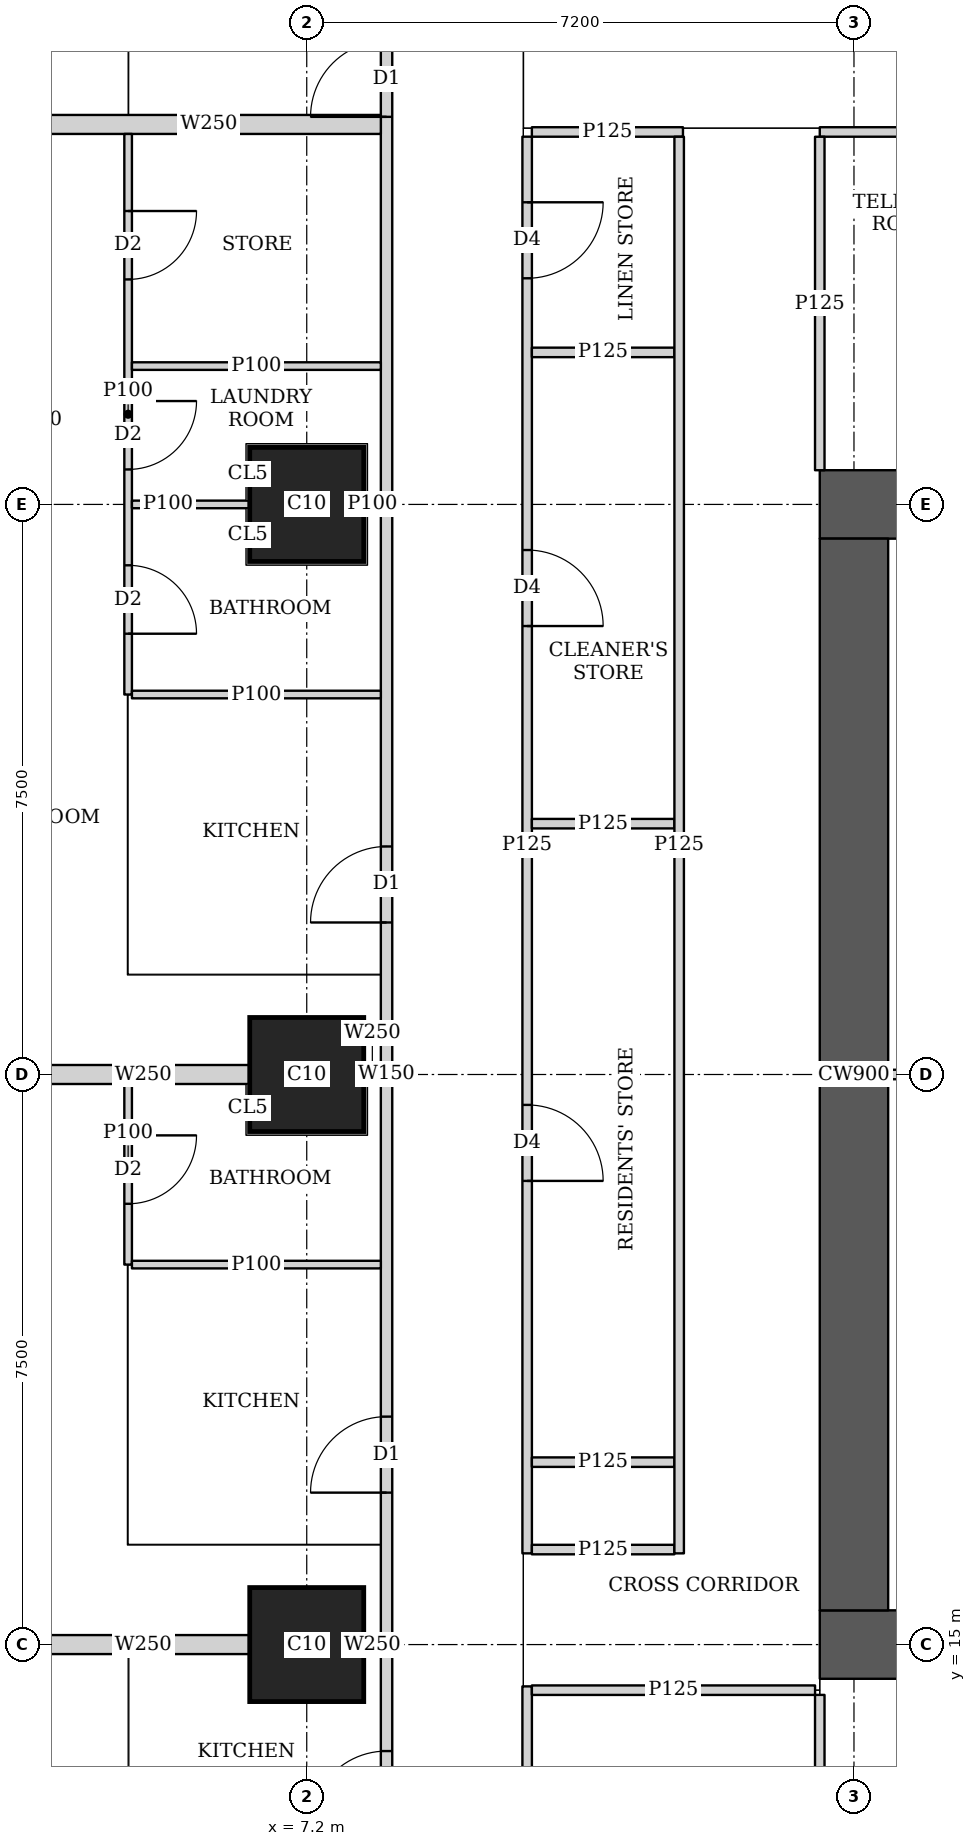
"""IFC4 building model, lengths in metres.
Left out: names, types, materials, properties, quantities, classifications, styles, units other than length and angle.
Written with IfcOpenShell. Run it as: python <this file> out.ifc"""

import sys

from ifc_helpers import new_model, si_unit, direction, frame, frame_2d, origin, origin_2d, place, context, subcontext, project, spatial, rectangle, extrude, element, fill, save


model = new_model("IFC4")
c1 = context("Model", 3, precision=1e-05, world=origin(), true_north=direction((0.0, 1.0)))
c2 = subcontext(c1, "Body", "Model", "MODEL_VIEW")
j1 = project(units=[si_unit("LENGTHUNIT", "METRE"), si_unit("PLANEANGLEUNIT", "RADIAN")], contexts=[c1])
p1 = place(None, origin())
s1 = spatial("IfcSite", under=j1, at=p1, CompositionType="ELEMENT")
p2 = place(p1, origin())
s2 = spatial("IfcBuilding", under=s1, at=p2, CompositionType="ELEMENT")
p3 = place(p2, frame((0.0, 0.0, 169.55)))
s3 = spatial("IfcBuildingStorey", under=s2, at=p3, CompositionType="ELEMENT", Elevation=169.55)
for number, where, z_axis, x_axis in (
    (1, (7.2, 15.0, 0.0), (0.0, 0.0, 1.0), (1.0, 0.0, 0.0)),
    (2, (7.2, 22.5, 0.0), (0.0, 0.0, 1.0), (1.0, 0.0, 0.0)),
    (3, (7.2, 30.0, 0.0), (0.0, 0.0, 1.0), (1.0, 0.0, 0.0)),
):
    element("IfcColumn", number, at=place(p3, frame(where, z_axis=z_axis, x_axis=x_axis)), inside=s3, PredefinedType="COLUMN", context=c2, shape_type="SweptSolid", body=[
        extrude(rectangle(XDim=1.5, YDim=1.5, at=origin_2d()), origin(), (0.0, 0.0, 1.0), 3.75),
    ])
p4 = place(p3, frame((13.95, 15.0, 0.0), z_axis=(0.0, 0.0, 1.0), x_axis=(1.0, 0.0, 0.0)))
e4 = element("IfcWall", 4, at=p4, inside=s3, PredefinedType="SHEAR", context=c2, shape_type="SweptSolid", body=[
    extrude(rectangle(XDim=15.3, YDim=0.9, at=frame_2d((7.65, 0.0))), origin(), (0.0, 0.0, 1.0), 3.75),
])
p5 = place(p4, frame((4.45, 0.0, 0.0)))
e5 = element("IfcOpeningElement", 5, at=p5, cuts=e4, PredefinedType="OPENING", context=c2, shape_type="SweptSolid", body=[
    extrude(rectangle(XDim=1.8, YDim=2.1, at=frame_2d((0.9, 1.05))), frame((0.0, 0.46, 0.0), z_axis=(0.0, -1.0, 0.0), x_axis=(1.0, 0.0, 0.0)), (0.0, 0.0, 1.0), 0.92),
])
p6 = place(p4, frame((10.7, 0.0, 0.0)))
e6 = element("IfcOpeningElement", 6, at=p6, cuts=e4, PredefinedType="OPENING", context=c2, shape_type="SweptSolid", body=[
    extrude(rectangle(XDim=1.1, YDim=2.1, at=frame_2d((0.55, 1.05))), frame((0.0, 0.46, 0.0), z_axis=(0.0, -1.0, 0.0), x_axis=(1.0, 0.0, 0.0)), (0.0, 0.0, 1.0), 0.92),
])
p7 = place(p3, frame((13.95, 30.0, 0.0), z_axis=(0.0, 0.0, 1.0), x_axis=(1.0, 0.0, 0.0)))
e7 = element("IfcWall", 7, at=p7, inside=s3, PredefinedType="SHEAR", context=c2, shape_type="SweptSolid", body=[
    extrude(rectangle(XDim=15.3, YDim=0.9, at=frame_2d((7.65, 0.0))), origin(), (0.0, 0.0, 1.0), 3.75),
])
p8 = place(p7, frame((4.45, 0.0, 0.0)))
e8 = element("IfcOpeningElement", 8, at=p8, cuts=e7, PredefinedType="OPENING", context=c2, shape_type="SweptSolid", body=[
    extrude(rectangle(XDim=1.8, YDim=2.1, at=frame_2d((0.9, 1.05))), frame((0.0, 0.46, 0.0), z_axis=(0.0, -1.0, 0.0), x_axis=(1.0, 0.0, 0.0)), (0.0, 0.0, 1.0), 0.92),
])
p9 = place(p7, frame((10.7, 0.0, 0.0)))
e9 = element("IfcOpeningElement", 9, at=p9, cuts=e7, PredefinedType="OPENING", context=c2, shape_type="SweptSolid", body=[
    extrude(rectangle(XDim=1.1, YDim=2.1, at=frame_2d((0.55, 1.05))), frame((0.0, 0.46, 0.0), z_axis=(0.0, -1.0, 0.0), x_axis=(1.0, 0.0, 0.0)), (0.0, 0.0, 1.0), 0.92),
])
p10 = place(p3, frame((14.4, 15.45, 0.0), z_axis=(0.0, 0.0, 1.0), x_axis=(0.0, 1.0, 0.0)))
e10 = element("IfcWall", 10, at=p10, inside=s3, PredefinedType="SHEAR", context=c2, shape_type="SweptSolid", body=[
    extrude(rectangle(XDim=14.1, YDim=0.9, at=frame_2d((7.05, 0.0))), origin(), (0.0, 0.0, 1.0), 3.75),
])
p11 = place(p3, frame((8.25, 1.957, 0.0), z_axis=(0.0, 0.0, 1.0), x_axis=(0.0, 1.0, 0.0)))
e11 = element("IfcWall", 11, at=p11, inside=s3, PredefinedType="SOLIDWALL", context=c2, shape_type="SweptSolid", body=[
    extrude(rectangle(XDim=41.111, YDim=0.15, at=frame_2d((20.556, 0.0))), origin(), (0.0, 0.0, 1.0), 3.5),
])
p12 = place(p11, frame((10.642, 0.0, 0.0)))
e12 = element("IfcOpeningElement", 12, at=p12, cuts=e11, PredefinedType="OPENING", context=c2, shape_type="SweptSolid", body=[
    extrude(rectangle(XDim=1.0, YDim=2.1, at=frame_2d((0.5, 1.05))), frame((0.0, 0.085, 0.0), z_axis=(0.0, -1.0, 0.0), x_axis=(1.0, 0.0, 0.0)), (0.0, 0.0, 1.0), 0.17),
])
p13 = place(p11, frame((15.042, 0.0, 0.0)))
e13 = element("IfcOpeningElement", 13, at=p13, cuts=e11, PredefinedType="OPENING", context=c2, shape_type="SweptSolid", body=[
    extrude(rectangle(XDim=1.0, YDim=2.1, at=frame_2d((0.5, 1.05))), frame((0.0, 0.085, 0.0), z_axis=(0.0, -1.0, 0.0), x_axis=(1.0, 0.0, 0.0)), (0.0, 0.0, 1.0), 0.17),
])
p14 = place(p11, frame((22.543, 0.0, 0.0)))
e14 = element("IfcOpeningElement", 14, at=p14, cuts=e11, PredefinedType="OPENING", context=c2, shape_type="SweptSolid", body=[
    extrude(rectangle(XDim=1.0, YDim=2.1, at=frame_2d((0.5, 1.05))), frame((0.0, 0.085, 0.0), z_axis=(0.0, -1.0, 0.0), x_axis=(1.0, 0.0, 0.0)), (0.0, 0.0, 1.0), 0.17),
])
p15 = place(p11, frame((33.142, 0.0, 0.0)))
e15 = element("IfcOpeningElement", 15, at=p15, cuts=e11, PredefinedType="OPENING", context=c2, shape_type="SweptSolid", body=[
    extrude(rectangle(XDim=1.0, YDim=2.1, at=frame_2d((0.5, 1.05))), frame((0.0, 0.085, 0.0), z_axis=(0.0, -1.0, 0.0), x_axis=(1.0, 0.0, 0.0)), (0.0, 0.0, 1.0), 0.17),
])
p16 = place(p3, frame((4.85, 19.999, 0.0), z_axis=(0.0, 0.0, 1.0), x_axis=(0.0, 1.0, 0.0)))
e16 = element("IfcWall", 16, at=p16, inside=s3, PredefinedType="PARTITIONING", context=c2, shape_type="SweptSolid", body=[
    extrude(rectangle(XDim=2.376, YDim=0.1, at=frame_2d((1.188, 0.0))), origin(), (0.0, 0.0, 1.0), 3.5),
])
p17 = place(p16, frame((0.8, 0.0, 0.0)))
e17 = element("IfcOpeningElement", 17, at=p17, cuts=e16, PredefinedType="OPENING", context=c2, shape_type="SweptSolid", body=[
    extrude(rectangle(XDim=0.9, YDim=2.1, at=frame_2d((0.45, 1.05))), frame((0.0, 0.06, 0.0), z_axis=(0.0, -1.0, 0.0), x_axis=(1.0, 0.0, 0.0)), (0.0, 0.0, 1.0), 0.12),
])
p18 = place(p3, frame((4.9, 19.999, 0.0), z_axis=(0.0, 0.0, 1.0), x_axis=(1.0, 0.0, 0.0)))
e18 = element("IfcWall", 18, at=p18, inside=s3, PredefinedType="PARTITIONING", context=c2, shape_type="SweptSolid", body=[
    extrude(rectangle(XDim=3.275, YDim=0.1, at=frame_2d((1.638, 0.0))), origin(), (0.0, 0.0, 1.0), 3.5),
])
p19 = place(p3, frame((3.65, 15.0, 0.0), z_axis=(0.0, 0.0, 1.0), x_axis=(1.0, 0.0, 0.0)))
e19 = element("IfcWall", 19, at=p19, inside=s3, PredefinedType="SOLIDWALL", context=c2, shape_type="SweptSolid", body=[
    extrude(rectangle(XDim=2.799, YDim=0.25, at=frame_2d((1.399, 0.0))), origin(), (0.0, 0.0, 1.0), 3.5),
])
p20 = place(p3, frame((7.951, 15.0, 0.0), z_axis=(0.0, 0.0, 1.0), x_axis=(1.0, 0.0, 0.0)))
e20 = element("IfcWall", 20, at=p20, inside=s3, PredefinedType="SOLIDWALL", context=c2, shape_type="SweptSolid", body=[
    extrude(rectangle(XDim=0.224, YDim=0.25, at=frame_2d((0.112, 0.0))), origin(), (0.0, 0.0, 1.0), 3.5),
])
p21 = place(p3, frame((4.85, 27.499, 0.0), z_axis=(0.0, 0.0, 1.0), x_axis=(0.0, 1.0, 0.0)))
e21 = element("IfcWall", 21, at=p21, inside=s3, PredefinedType="PARTITIONING", context=c2, shape_type="SweptSolid", body=[
    extrude(rectangle(XDim=7.375, YDim=0.1, at=frame_2d((3.688, 0.0))), origin(), (0.0, 0.0, 1.0), 3.5),
])
p22 = place(p21, frame((0.8, 0.0, 0.0)))
e22 = element("IfcOpeningElement", 22, at=p22, cuts=e21, PredefinedType="OPENING", context=c2, shape_type="SweptSolid", body=[
    extrude(rectangle(XDim=0.9, YDim=2.1, at=frame_2d((0.45, 1.05))), frame((0.0, 0.06, 0.0), z_axis=(0.0, -1.0, 0.0), x_axis=(1.0, 0.0, 0.0)), (0.0, 0.0, 1.0), 0.12),
])
p23 = place(p21, frame((2.961, 0.0, 0.0)))
e23 = element("IfcOpeningElement", 23, at=p23, cuts=e21, PredefinedType="OPENING", context=c2, shape_type="SweptSolid", body=[
    extrude(rectangle(XDim=0.9, YDim=2.1, at=frame_2d((0.45, 1.05))), frame((0.0, 0.06, 0.0), z_axis=(0.0, -1.0, 0.0), x_axis=(1.0, 0.0, 0.0)), (0.0, 0.0, 1.0), 0.12),
])
p24 = place(p21, frame((5.461, 0.0, 0.0)))
e24 = element("IfcOpeningElement", 24, at=p24, cuts=e21, PredefinedType="OPENING", context=c2, shape_type="SweptSolid", body=[
    extrude(rectangle(XDim=0.9, YDim=2.1, at=frame_2d((0.45, 1.05))), frame((0.0, 0.06, 0.0), z_axis=(0.0, -1.0, 0.0), x_axis=(1.0, 0.0, 0.0)), (0.0, 0.0, 1.0), 0.12),
])
p25 = place(p3, frame((4.9, 27.499, 0.0), z_axis=(0.0, 0.0, 1.0), x_axis=(1.0, 0.0, 0.0)))
e25 = element("IfcWall", 25, at=p25, inside=s3, PredefinedType="PARTITIONING", context=c2, shape_type="SweptSolid", body=[
    extrude(rectangle(XDim=3.275, YDim=0.1, at=frame_2d((1.638, 0.0))), origin(), (0.0, 0.0, 1.0), 3.5),
])
p26 = place(p3, frame((4.9, 30.0, 0.0), z_axis=(0.0, 0.0, 1.0), x_axis=(1.0, 0.0, 0.0)))
e26 = element("IfcWall", 26, at=p26, inside=s3, PredefinedType="PARTITIONING", context=c2, shape_type="SweptSolid", body=[
    extrude(rectangle(XDim=1.549, YDim=0.1, at=frame_2d((0.774, 0.0))), origin(), (0.0, 0.0, 1.0), 3.5),
])
p27 = place(p3, frame((7.951, 30.0, 0.0), z_axis=(0.0, 0.0, 1.0), x_axis=(1.0, 0.0, 0.0)))
e27 = element("IfcWall", 27, at=p27, inside=s3, PredefinedType="PARTITIONING", context=c2, shape_type="SweptSolid", body=[
    extrude(rectangle(XDim=0.224, YDim=0.1, at=frame_2d((0.112, 0.0))), origin(), (0.0, 0.0, 1.0), 3.5),
])
p28 = place(p3, frame((4.9, 31.82, 0.0), z_axis=(0.0, 0.0, 1.0), x_axis=(1.0, 0.0, 0.0)))
e28 = element("IfcWall", 28, at=p28, inside=s3, PredefinedType="PARTITIONING", context=c2, shape_type="SweptSolid", body=[
    extrude(rectangle(XDim=3.275, YDim=0.1, at=frame_2d((1.638, 0.0))), origin(), (0.0, 0.0, 1.0), 3.5),
])
p29 = place(p3, frame((3.65, 22.5, 0.0), z_axis=(0.0, 0.0, 1.0), x_axis=(1.0, 0.0, 0.0)))
e29 = element("IfcWall", 29, at=p29, inside=s3, PredefinedType="SOLIDWALL", context=c2, shape_type="SweptSolid", body=[
    extrude(rectangle(XDim=2.799, YDim=0.25, at=frame_2d((1.399, 0.0))), origin(), (0.0, 0.0, 1.0), 3.5),
])
p30 = place(p3, frame((7.951, 22.5, 0.0), z_axis=(0.0, 0.0, 1.0), x_axis=(1.0, 0.0, 0.0)))
e30 = element("IfcWall", 30, at=p30, inside=s3, PredefinedType="SOLIDWALL", context=c2, shape_type="SweptSolid", body=[
    extrude(rectangle(XDim=0.224, YDim=0.25, at=frame_2d((0.112, 0.0))), origin(), (0.0, 0.0, 1.0), 3.5),
])
p31 = place(p3, frame((3.65, 34.999, 0.0), z_axis=(0.0, 0.0, 1.0), x_axis=(1.0, 0.0, 0.0)))
e31 = element("IfcWall", 31, at=p31, inside=s3, PredefinedType="SOLIDWALL", context=c2, shape_type="SweptSolid", body=[
    extrude(rectangle(XDim=4.525, YDim=0.25, at=frame_2d((2.263, 0.0))), origin(), (0.0, 0.0, 1.0), 3.5),
])
p32 = place(p3, frame((10.1, 10.162, 0.0), z_axis=(0.0, 0.0, 1.0), x_axis=(0.0, 1.0, 0.0)))
e32 = element("IfcWall", 32, at=p32, inside=s3, PredefinedType="PARTITIONING", context=c2, shape_type="SweptSolid", body=[
    extrude(rectangle(XDim=4.288, YDim=0.125, at=frame_2d((2.144, 0.0))), origin(), (0.0, 0.0, 1.0), 3.5),
])
p33 = place(p32, frame((1.563, 0.0, 0.0)))
e33 = element("IfcOpeningElement", 33, at=p33, cuts=e32, PredefinedType="OPENING", context=c2, shape_type="SweptSolid", body=[
    extrude(rectangle(XDim=1.0, YDim=2.1, at=frame_2d((0.5, 1.05))), frame((0.0, 0.073, 0.0), z_axis=(0.0, -1.0, 0.0), x_axis=(1.0, 0.0, 0.0)), (0.0, 0.0, 1.0), 0.145),
])
p34 = place(p3, frame((10.1, 16.2, 0.0), z_axis=(0.0, 0.0, 1.0), x_axis=(0.0, 1.0, 0.0)))
e34 = element("IfcWall", 34, at=p34, inside=s3, PredefinedType="PARTITIONING", context=c2, shape_type="SweptSolid", body=[
    extrude(rectangle(XDim=18.638, YDim=0.125, at=frame_2d((9.319, 0.0))), origin(), (0.0, 0.0, 1.0), 3.5),
])
p35 = place(p34, frame((4.9, 0.0, 0.0)))
e35 = element("IfcOpeningElement", 35, at=p35, cuts=e34, PredefinedType="OPENING", context=c2, shape_type="SweptSolid", body=[
    extrude(rectangle(XDim=1.0, YDim=2.1, at=frame_2d((0.5, 1.05))), frame((0.0, 0.073, 0.0), z_axis=(0.0, -1.0, 0.0), x_axis=(1.0, 0.0, 0.0)), (0.0, 0.0, 1.0), 0.145),
])
p36 = place(p34, frame((12.2, 0.0, 0.0)))
e36 = element("IfcOpeningElement", 36, at=p36, cuts=e34, PredefinedType="OPENING", context=c2, shape_type="SweptSolid", body=[
    extrude(rectangle(XDim=1.0, YDim=2.1, at=frame_2d((0.5, 1.05))), frame((0.0, 0.073, 0.0), z_axis=(0.0, -1.0, 0.0), x_axis=(1.0, 0.0, 0.0)), (0.0, 0.0, 1.0), 0.145),
])
p37 = place(p34, frame((16.775, 0.0, 0.0)))
e37 = element("IfcOpeningElement", 37, at=p37, cuts=e34, PredefinedType="OPENING", context=c2, shape_type="SweptSolid", body=[
    extrude(rectangle(XDim=1.0, YDim=2.1, at=frame_2d((0.5, 1.05))), frame((0.0, 0.073, 0.0), z_axis=(0.0, -1.0, 0.0), x_axis=(1.0, 0.0, 0.0)), (0.0, 0.0, 1.0), 0.145),
])
p38 = place(p3, frame((10.162, 14.4, 0.0), z_axis=(0.0, 0.0, 1.0), x_axis=(1.0, 0.0, 0.0)))
e38 = element("IfcWall", 38, at=p38, inside=s3, PredefinedType="PARTITIONING", context=c2, shape_type="SweptSolid", body=[
    extrude(rectangle(XDim=3.726, YDim=0.125, at=frame_2d((1.863, 0.0))), origin(), (0.0, 0.0, 1.0), 3.5),
])
for number, where, z_axis, x_axis in (
    (39, (10.162, 17.4, 0.0), (0.0, 0.0, 1.0), (1.0, 0.0, 0.0)),
    (40, (10.162, 25.8, 0.0), (0.0, 0.0, 1.0), (1.0, 0.0, 0.0)),
    (41, (10.162, 32.0, 0.0), (0.0, 0.0, 1.0), (1.0, 0.0, 0.0)),
):
    element("IfcWall", number, at=place(p3, frame(where, z_axis=z_axis, x_axis=x_axis)), inside=s3, PredefinedType="PARTITIONING", context=c2, shape_type="SweptSolid", body=[
        extrude(rectangle(XDim=1.875, YDim=0.125, at=frame_2d((0.938, 0.0))), origin(), (0.0, 0.0, 1.0), 3.5),
    ])
p39 = place(p3, frame((12.1, 16.2, 0.0), z_axis=(0.0, 0.0, 1.0), x_axis=(0.0, 1.0, 0.0)))
e42 = element("IfcWall", 42, at=p39, inside=s3, PredefinedType="PARTITIONING", context=c2, shape_type="SweptSolid", body=[
    extrude(rectangle(XDim=18.637, YDim=0.125, at=frame_2d((9.318, 0.0))), origin(), (0.0, 0.0, 1.0), 3.5),
])
p40 = place(p3, frame((10.162, 16.25, 0.0), z_axis=(0.0, 0.0, 1.0), x_axis=(1.0, 0.0, 0.0)))
e43 = element("IfcWall", 43, at=p40, inside=s3, PredefinedType="PARTITIONING", context=c2, shape_type="SweptSolid", body=[
    extrude(rectangle(XDim=1.875, YDim=0.125, at=frame_2d((0.938, 0.0))), origin(), (0.0, 0.0, 1.0), 3.5),
])
p41 = place(p3, frame((13.95, 10.163, 0.0), z_axis=(0.0, 0.0, 1.0), x_axis=(0.0, 1.0, 0.0)))
e44 = element("IfcWall", 44, at=p41, inside=s3, PredefinedType="PARTITIONING", context=c2, shape_type="SweptSolid", body=[
    extrude(rectangle(XDim=4.175, YDim=0.125, at=frame_2d((2.087, 0.0))), origin(), (0.0, 0.0, 1.0), 3.5),
])
p42 = place(p3, frame((13.95, 30.45, 0.0), z_axis=(0.0, 0.0, 1.0), x_axis=(0.0, 1.0, 0.0)))
e45 = element("IfcWall", 45, at=p42, inside=s3, PredefinedType="PARTITIONING", context=c2, shape_type="SweptSolid", body=[
    extrude(rectangle(XDim=4.387, YDim=0.125, at=frame_2d((2.193, 0.0))), origin(), (0.0, 0.0, 1.0), 3.5),
])
p43 = place(p3, frame((10.162, 34.9, 0.0), z_axis=(0.0, 0.0, 1.0), x_axis=(1.0, 0.0, 0.0)))
e46 = element("IfcWall", 46, at=p43, inside=s3, PredefinedType="PARTITIONING", context=c2, shape_type="SweptSolid", body=[
    extrude(rectangle(XDim=1.988, YDim=0.125, at=frame_2d((0.994, 0.0))), origin(), (0.0, 0.0, 1.0), 3.5),
])
p44 = place(p3, frame((13.95, 34.9, 0.0), z_axis=(0.0, 0.0, 1.0), x_axis=(1.0, 0.0, 0.0)))
e47 = element("IfcWall", 47, at=p44, inside=s3, PredefinedType="PARTITIONING", context=c2, shape_type="SweptSolid", body=[
    extrude(rectangle(XDim=7.5, YDim=0.125, at=frame_2d((3.75, 0.0))), origin(), (0.0, 0.0, 1.0), 3.5),
])
p45 = place(p44, frame((3.95, 0.0, 0.0)))
e48 = element("IfcOpeningElement", 48, at=p45, cuts=e47, PredefinedType="OPENING", context=c2, shape_type="SweptSolid", body=[
    extrude(rectangle(XDim=1.8, YDim=2.1, at=frame_2d((0.9, 1.05))), frame((0.0, 0.073, 0.0), z_axis=(0.0, -1.0, 0.0), x_axis=(1.0, 0.0, 0.0)), (0.0, 0.0, 1.0), 0.145),
])
p46 = place(p3, frame((14.85, 22.5, 0.0), z_axis=(0.0, 0.0, 1.0), x_axis=(1.0, 0.0, 0.0)))
e49 = element("IfcWall", 49, at=p46, inside=s3, PredefinedType="PARTITIONING", context=c2, shape_type="SweptSolid", body=[
    extrude(rectangle(XDim=1.95, YDim=0.125, at=frame_2d((0.975, 0.0))), origin(), (0.0, 0.0, 1.0), 3.5),
])
p47 = place(p12, origin())
e50 = element("IfcDoor", 50, at=p47, inside=s3, OperationType="SINGLE_SWING_LEFT", PredefinedType="DOOR", context=c2, shape_type="SweptSolid", body=[
    extrude(rectangle(XDim=1.0, YDim=2.1, at=frame_2d((0.5, 1.05))), frame((0.0, 0.025, 0.0), z_axis=(0.0, -1.0, 0.0), x_axis=(1.0, 0.0, 0.0)), (0.0, 0.0, 1.0), 0.05),
])
fill(e12, e50)
p48 = place(p17, origin())
e51 = element("IfcDoor", 51, at=p48, inside=s3, OperationType="SINGLE_SWING_LEFT", PredefinedType="DOOR", context=c2, shape_type="SweptSolid", body=[
    extrude(rectangle(XDim=0.9, YDim=2.1, at=frame_2d((0.45, 1.05))), frame((0.0, 0.025, 0.0), z_axis=(0.0, -1.0, 0.0), x_axis=(1.0, 0.0, 0.0)), (0.0, 0.0, 1.0), 0.05),
])
fill(e17, e51)
p49 = place(p13, origin())
e52 = element("IfcDoor", 52, at=p49, inside=s3, OperationType="SINGLE_SWING_LEFT", PredefinedType="DOOR", context=c2, shape_type="SweptSolid", body=[
    extrude(rectangle(XDim=1.0, YDim=2.1, at=frame_2d((0.5, 1.05))), frame((0.0, 0.025, 0.0), z_axis=(0.0, -1.0, 0.0), x_axis=(1.0, 0.0, 0.0)), (0.0, 0.0, 1.0), 0.05),
])
fill(e13, e52)
p50 = place(p22, origin())
e53 = element("IfcDoor", 53, at=p50, inside=s3, OperationType="SINGLE_SWING_RIGHT", PredefinedType="DOOR", context=c2, shape_type="SweptSolid", body=[
    extrude(rectangle(XDim=0.9, YDim=2.1, at=frame_2d((0.45, 1.05))), frame((0.0, 0.025, 0.0), z_axis=(0.0, -1.0, 0.0), x_axis=(1.0, 0.0, 0.0)), (0.0, 0.0, 1.0), 0.05),
])
fill(e22, e53)
p51 = place(p23, origin())
e54 = element("IfcDoor", 54, at=p51, inside=s3, OperationType="SINGLE_SWING_LEFT", PredefinedType="DOOR", context=c2, shape_type="SweptSolid", body=[
    extrude(rectangle(XDim=0.9, YDim=2.1, at=frame_2d((0.45, 1.05))), frame((0.0, 0.025, 0.0), z_axis=(0.0, -1.0, 0.0), x_axis=(1.0, 0.0, 0.0)), (0.0, 0.0, 1.0), 0.05),
])
fill(e23, e54)
p52 = place(p24, origin())
e55 = element("IfcDoor", 55, at=p52, inside=s3, OperationType="SINGLE_SWING_LEFT", PredefinedType="DOOR", context=c2, shape_type="SweptSolid", body=[
    extrude(rectangle(XDim=0.9, YDim=2.1, at=frame_2d((0.45, 1.05))), frame((0.0, 0.025, 0.0), z_axis=(0.0, -1.0, 0.0), x_axis=(1.0, 0.0, 0.0)), (0.0, 0.0, 1.0), 0.05),
])
fill(e24, e55)
p53 = place(p14, origin())
e56 = element("IfcDoor", 56, at=p53, inside=s3, OperationType="SINGLE_SWING_LEFT", PredefinedType="DOOR", context=c2, shape_type="SweptSolid", body=[
    extrude(rectangle(XDim=1.0, YDim=2.1, at=frame_2d((0.5, 1.05))), frame((0.0, 0.025, 0.0), z_axis=(0.0, -1.0, 0.0), x_axis=(1.0, 0.0, 0.0)), (0.0, 0.0, 1.0), 0.05),
])
fill(e14, e56)
p54 = place(p15, origin())
e57 = element("IfcDoor", 57, at=p54, inside=s3, OperationType="SINGLE_SWING_LEFT", PredefinedType="DOOR", context=c2, shape_type="SweptSolid", body=[
    extrude(rectangle(XDim=1.0, YDim=2.1, at=frame_2d((0.5, 1.05))), frame((0.0, 0.025, 0.0), z_axis=(0.0, -1.0, 0.0), x_axis=(1.0, 0.0, 0.0)), (0.0, 0.0, 1.0), 0.05),
])
fill(e15, e57)
p55 = place(p35, origin())
e58 = element("IfcDoor", 58, at=p55, inside=s3, OperationType="SINGLE_SWING_RIGHT", PredefinedType="DOOR", context=c2, shape_type="SweptSolid", body=[
    extrude(rectangle(XDim=1.0, YDim=2.1, at=frame_2d((0.5, 1.05))), frame((0.0, 0.025, 0.0), z_axis=(0.0, -1.0, 0.0), x_axis=(1.0, 0.0, 0.0)), (0.0, 0.0, 1.0), 0.05),
])
fill(e35, e58)
p56 = place(p36, origin())
e59 = element("IfcDoor", 59, at=p56, inside=s3, OperationType="SINGLE_SWING_RIGHT", PredefinedType="DOOR", context=c2, shape_type="SweptSolid", body=[
    extrude(rectangle(XDim=1.0, YDim=2.1, at=frame_2d((0.5, 1.05))), frame((0.0, 0.025, 0.0), z_axis=(0.0, -1.0, 0.0), x_axis=(1.0, 0.0, 0.0)), (0.0, 0.0, 1.0), 0.05),
])
fill(e36, e59)
p57 = place(p37, origin())
e60 = element("IfcDoor", 60, at=p57, inside=s3, OperationType="SINGLE_SWING_LEFT", PredefinedType="DOOR", context=c2, shape_type="SweptSolid", body=[
    extrude(rectangle(XDim=1.0, YDim=2.1, at=frame_2d((0.5, 1.05))), frame((0.0, 0.025, 0.0), z_axis=(0.0, -1.0, 0.0), x_axis=(1.0, 0.0, 0.0)), (0.0, 0.0, 1.0), 0.05),
])
fill(e37, e60)
save(model, sys.argv[1])
